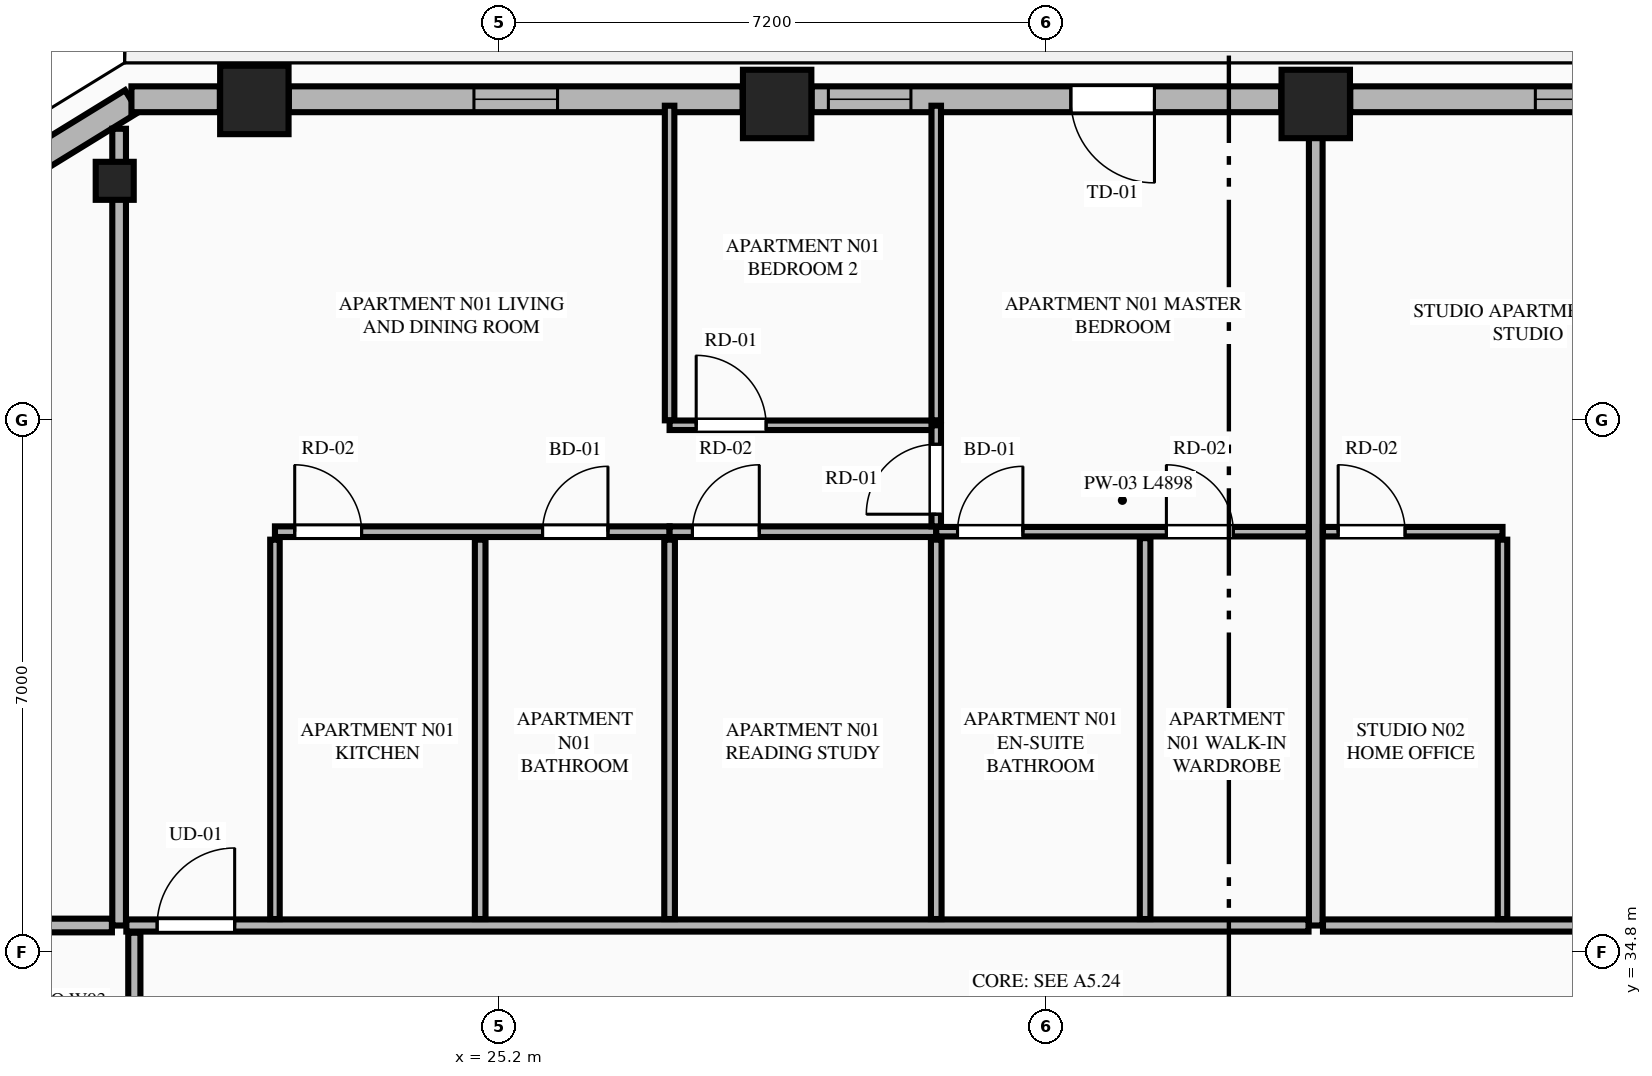
"""IFC4 building model, lengths in metres.
Left out: names, types, materials, properties, quantities, classifications, styles, units other than length and angle.
Written with IfcOpenShell. Run it as: python <this file> out.ifc"""

import sys

from ifc_helpers import new_model, si_unit, direction, frame, frame_2d, origin, origin_2d, place, context, subcontext, project, spatial, rectangle, extrude, element, fill, save


model = new_model("IFC4")
c1 = context("Model", 3, precision=1e-05, world=origin(), true_north=direction((0.0, 1.0)))
c2 = subcontext(c1, "Body", "Model", "MODEL_VIEW")
j1 = project(units=[si_unit("LENGTHUNIT", "METRE"), si_unit("PLANEANGLEUNIT", "RADIAN")], contexts=[c1])
p1 = place(None, origin())
s1 = spatial("IfcSite", under=j1, at=p1, CompositionType="ELEMENT")
p2 = place(p1, origin())
s2 = spatial("IfcBuilding", under=s1, at=p2, CompositionType="ELEMENT")
p3 = place(p2, frame((0.0, 0.0, 203.85)))
s3 = spatial("IfcBuildingStorey", under=s2, at=p3, CompositionType="ELEMENT", Elevation=203.85)
for number, where, z_axis, x_axis in (
    (1, (35.943, 45.958, 0.0), (0.0, 0.0, 1.0), (1.0, 0.0, 0.0)),
    (2, (28.857, 45.958, 0.0), (0.0, 0.0, 1.0), (1.0, 0.0, 0.0)),
    (3, (21.979, 46.011, 0.0), (0.0, 0.0, 1.0), (1.0, 0.0, 0.0)),
):
    element("IfcColumn", number, at=place(p3, frame(where, z_axis=z_axis, x_axis=x_axis)), inside=s3, PredefinedType="COLUMN", context=c2, shape_type="SweptSolid", body=[
        extrude(rectangle(XDim=0.9, YDim=0.9, at=origin_2d()), origin(), (0.0, 0.0, 1.0), 3.55),
    ])
p4 = place(p3, frame((20.142, 44.947, 0.0), z_axis=(0.0, 0.0, 1.0), x_axis=(-0.865230187018, -0.501374833306, 0.0)))
e4 = element("IfcColumn", 4, at=p4, inside=s3, PredefinedType="PILASTER", context=c2, shape_type="SweptSolid", body=[
    extrude(rectangle(XDim=0.5, YDim=0.35, at=origin_2d()), origin(), (0.0, 0.0, 1.0), 3.55),
])
p5 = place(p3, frame((20.367, 45.995, 0.0), z_axis=(0.0, 0.0, 1.0), x_axis=(-0.851713271379, -0.524008113828, 0.0)))
e5 = element("IfcWall", 5, at=p5, inside=s3, PredefinedType="STANDARD", context=c2, shape_type="SweptSolid", body=[
    extrude(rectangle(XDim=1.678, YDim=0.34, at=frame_2d((0.839, 0.0))), origin(), (0.0, 0.0, 1.0), 3.35),
])
p6 = place(p3, frame((42.367, 46.02, 0.0), z_axis=(0.0, 0.0, 1.0), x_axis=(-1.0, 0.0, 0.0)))
e6 = element("IfcWall", 6, at=p6, inside=s3, PredefinedType="STANDARD", context=c2, shape_type="SweptSolid", body=[
    extrude(rectangle(XDim=5.97, YDim=0.34, at=frame_2d((2.985, 0.0))), origin(), (0.0, 0.0, 1.0), 2.883),
])
p7 = place(p6, frame((2.435, 0.0, 0.75)))
e7 = element("IfcOpeningElement", 7, at=p7, cuts=e6, PredefinedType="OPENING", context=c2, shape_type="SweptSolid", body=[
    extrude(rectangle(XDim=1.1, YDim=1.983, at=frame_2d((0.55, 0.991))), frame((0.0, 0.18, 0.0), z_axis=(0.0, -1.0, 0.0), x_axis=(1.0, 0.0, 0.0)), (0.0, 0.0, 1.0), 0.36),
])
p8 = place(p3, frame((35.489, 46.02, 0.0), z_axis=(0.0, 0.0, 1.0), x_axis=(-1.0, 0.0, 0.0)))
e8 = element("IfcWall", 8, at=p8, inside=s3, PredefinedType="STANDARD", context=c2, shape_type="SweptSolid", body=[
    extrude(rectangle(XDim=6.178, YDim=0.34, at=frame_2d((3.089, 0.0))), origin(), (0.0, 0.0, 1.0), 2.883),
])
p9 = place(p8, frame((1.668, 0.0, 0.0)))
e9 = element("IfcOpeningElement", 9, at=p9, cuts=e8, PredefinedType="OPENING", context=c2, shape_type="SweptSolid", body=[
    extrude(rectangle(XDim=1.1, YDim=2.25, at=frame_2d((0.55, 1.125))), frame((0.0, 0.18, 0.0), z_axis=(0.0, -1.0, 0.0), x_axis=(1.0, 0.0, 0.0)), (0.0, 0.0, 1.0), 0.36),
])
p10 = place(p8, frame((4.872, 0.0, 0.75)))
e10 = element("IfcOpeningElement", 10, at=p10, cuts=e8, PredefinedType="OPENING", context=c2, shape_type="SweptSolid", body=[
    extrude(rectangle(XDim=1.086, YDim=1.983, at=frame_2d((0.543, 0.991))), frame((0.0, 0.18, 0.0), z_axis=(0.0, -1.0, 0.0), x_axis=(1.0, 0.0, 0.0)), (0.0, 0.0, 1.0), 0.36),
])
p11 = place(p3, frame((28.403, 46.02, 0.0), z_axis=(0.0, 0.0, 1.0), x_axis=(-1.0, 0.0, 0.0)))
e11 = element("IfcWall", 11, at=p11, inside=s3, PredefinedType="STANDARD", context=c2, shape_type="SweptSolid", body=[
    extrude(rectangle(XDim=5.97, YDim=0.34, at=frame_2d((2.985, 0.0))), origin(), (0.0, 0.0, 1.0), 2.883),
])
p12 = place(p11, frame((2.435, 0.0, 0.75)))
e12 = element("IfcOpeningElement", 12, at=p12, cuts=e11, PredefinedType="OPENING", context=c2, shape_type="SweptSolid", body=[
    extrude(rectangle(XDim=1.1, YDim=1.983, at=frame_2d((0.55, 0.991))), frame((0.0, 0.18, 0.0), z_axis=(0.0, -1.0, 0.0), x_axis=(1.0, 0.0, 0.0)), (0.0, 0.0, 1.0), 0.36),
])
p13 = place(p3, frame((21.525, 46.02, 0.0), z_axis=(0.0, 0.0, 1.0), x_axis=(-1.0, 0.0, 0.0)))
e13 = element("IfcWall", 13, at=p13, inside=s3, PredefinedType="STANDARD", context=c2, shape_type="SweptSolid", body=[
    extrude(rectangle(XDim=1.163, YDim=0.34, at=frame_2d((0.582, 0.0))), origin(), (0.0, 0.0, 1.0), 3.35),
])
p14 = place(p3, frame((20.2, 35.15, 0.0), z_axis=(0.0, 0.0, 1.0), x_axis=(0.0, 1.0, 0.0)))
e14 = element("IfcWall", 14, at=p14, inside=s3, PredefinedType="PARTITIONING", context=c2, shape_type="SweptSolid", body=[
    extrude(rectangle(XDim=10.482, YDim=0.18, at=frame_2d((5.241, 0.0))), origin(), (0.0, 0.0, 1.0), 3.35),
])
p15 = place(p3, frame((35.943, 35.15, 0.0), z_axis=(0.0, 0.0, 1.0), x_axis=(0.0, 1.0, 0.0)))
e15 = element("IfcWall", 15, at=p15, inside=s3, PredefinedType="PARTITIONING", context=c2, shape_type="SweptSolid", body=[
    extrude(rectangle(XDim=10.695, YDim=0.18, at=frame_2d((5.348, 0.0))), origin(), (0.0, 0.0, 1.0), 2.807),
])
p16 = place(p3, frame((20.295, 35.15, 0.0), z_axis=(0.0, 0.0, 1.0), x_axis=(1.0, 0.0, 0.0)))
e16 = element("IfcWall", 16, at=p16, inside=s3, PredefinedType="PARTITIONING", context=c2, shape_type="SweptSolid", body=[
    extrude(rectangle(XDim=15.553, YDim=0.16, at=frame_2d((7.776, 0.0))), origin(), (0.0, 0.0, 1.0), 3.35),
])
p17 = place(p16, frame((0.405, 0.0, 0.0)))
e17 = element("IfcOpeningElement", 17, at=p17, cuts=e16, PredefinedType="OPENING", context=c2, shape_type="SweptSolid", body=[
    extrude(rectangle(XDim=1.02, YDim=2.25, at=frame_2d((0.51, 1.125))), frame((0.0, 0.09, 0.0), z_axis=(0.0, -1.0, 0.0), x_axis=(1.0, 0.0, 0.0)), (0.0, 0.0, 1.0), 0.18),
])
p18 = place(p3, frame((22.25, 35.235, 0.0), z_axis=(0.0, 0.0, 1.0), x_axis=(0.0, 1.0, 0.0)))
e18 = element("IfcWall", 18, at=p18, inside=s3, PredefinedType="PARTITIONING", context=c2, shape_type="SweptSolid", body=[
    extrude(rectangle(XDim=4.991, YDim=0.125, at=frame_2d((2.496, 0.0))), origin(), (0.0, 0.0, 1.0), 2.807),
])
p19 = place(p3, frame((22.25, 40.331, 0.0), z_axis=(0.0, 0.0, 1.0), x_axis=(1.0, 0.0, 0.0)))
e19 = element("IfcWall", 19, at=p19, inside=s3, PredefinedType="PLUMBINGWALL", context=c2, shape_type="SweptSolid", body=[
    extrude(rectangle(XDim=5.192, YDim=0.14, at=frame_2d((2.596, 0.0))), origin(), (0.0, 0.0, 1.0), 3.35),
])
p20 = place(p19, frame((3.521, 0.0, 0.0)))
e20 = element("IfcOpeningElement", 20, at=p20, cuts=e19, PredefinedType="OPENING", context=c2, shape_type="SweptSolid", body=[
    extrude(rectangle(XDim=0.86, YDim=2.1, at=frame_2d((0.43, 1.05))), frame((0.0, 0.08, 0.0), z_axis=(0.0, -1.0, 0.0), x_axis=(1.0, 0.0, 0.0)), (0.0, 0.0, 1.0), 0.16),
])
p21 = place(p19, frame((0.26, 0.0, 0.0)))
e21 = element("IfcOpeningElement", 21, at=p21, cuts=e19, PredefinedType="OPENING", context=c2, shape_type="SweptSolid", body=[
    extrude(rectangle(XDim=0.88, YDim=2.15, at=frame_2d((0.44, 1.075))), frame((0.0, 0.08, 0.0), z_axis=(0.0, -1.0, 0.0), x_axis=(1.0, 0.0, 0.0)), (0.0, 0.0, 1.0), 0.16),
])
p22 = place(p3, frame((27.442, 40.331, 0.0), z_axis=(0.0, 0.0, 1.0), x_axis=(1.0, 0.0, 0.0)))
e22 = element("IfcWall", 22, at=p22, inside=s3, PredefinedType="PLUMBINGWALL", context=c2, shape_type="SweptSolid", body=[
    extrude(rectangle(XDim=3.508, YDim=0.14, at=frame_2d((1.754, 0.0))), origin(), (0.0, 0.0, 1.0), 3.35),
])
p23 = place(p22, frame((0.3, 0.0, 0.0)))
e23 = element("IfcOpeningElement", 23, at=p23, cuts=e22, PredefinedType="OPENING", context=c2, shape_type="SweptSolid", body=[
    extrude(rectangle(XDim=0.88, YDim=2.15, at=frame_2d((0.44, 1.075))), frame((0.0, 0.08, 0.0), z_axis=(0.0, -1.0, 0.0), x_axis=(1.0, 0.0, 0.0)), (0.0, 0.0, 1.0), 0.16),
])
p24 = place(p3, frame((30.95, 40.331, 0.0), z_axis=(0.0, 0.0, 1.0), x_axis=(1.0, 0.0, 0.0)))
e24 = element("IfcWall", 24, at=p24, inside=s3, PredefinedType="PARTITIONING", context=c2, shape_type="SweptSolid", body=[
    extrude(rectangle(XDim=4.898, YDim=0.125, at=frame_2d((2.449, 0.0))), origin(), (0.0, 0.0, 1.0), 3.35),
])
p25 = place(p24, frame((0.28, 0.0, 0.0)))
e25 = element("IfcOpeningElement", 25, at=p25, cuts=e24, PredefinedType="OPENING", context=c2, shape_type="SweptSolid", body=[
    extrude(rectangle(XDim=0.86, YDim=2.1, at=frame_2d((0.43, 1.05))), frame((0.0, 0.073, 0.0), z_axis=(0.0, -1.0, 0.0), x_axis=(1.0, 0.0, 0.0)), (0.0, 0.0, 1.0), 0.145),
])
p26 = place(p24, frame((3.028, 0.0, 0.0)))
e26 = element("IfcOpeningElement", 26, at=p26, cuts=e24, PredefinedType="OPENING", context=c2, shape_type="SweptSolid", body=[
    extrude(rectangle(XDim=0.88, YDim=2.15, at=frame_2d((0.44, 1.075))), frame((0.0, 0.073, 0.0), z_axis=(0.0, -1.0, 0.0), x_axis=(1.0, 0.0, 0.0)), (0.0, 0.0, 1.0), 0.145),
])
p27 = place(p3, frame((24.95, 35.235, 0.0), z_axis=(0.0, 0.0, 1.0), x_axis=(0.0, 1.0, 0.0)))
e27 = element("IfcWall", 27, at=p27, inside=s3, PredefinedType="PLUMBINGWALL", context=c2, shape_type="SweptSolid", body=[
    extrude(rectangle(XDim=4.991, YDim=0.14, at=frame_2d((2.496, 0.0))), origin(), (0.0, 0.0, 1.0), 3.35),
])
p28 = place(p3, frame((27.442, 41.796, 0.0), z_axis=(0.0, 0.0, 1.0), x_axis=(0.0, 1.0, 0.0)))
e28 = element("IfcWall", 28, at=p28, inside=s3, PredefinedType="PARTITIONING", context=c2, shape_type="SweptSolid", body=[
    extrude(rectangle(XDim=4.139, YDim=0.125, at=frame_2d((2.07, 0.0))), origin(), (0.0, 0.0, 1.0), 3.35),
])
p29 = place(p3, frame((27.442, 41.731, 0.0), z_axis=(0.0, 0.0, 1.0), x_axis=(1.0, 0.0, 0.0)))
e29 = element("IfcWall", 29, at=p29, inside=s3, PredefinedType="PARTITIONING", context=c2, shape_type="SweptSolid", body=[
    extrude(rectangle(XDim=3.508, YDim=0.125, at=frame_2d((1.754, 0.0))), origin(), (0.0, 0.0, 1.0), 3.35),
])
p30 = place(p29, frame((0.35, 0.0, 0.0)))
e30 = element("IfcOpeningElement", 30, at=p30, cuts=e29, PredefinedType="OPENING", context=c2, shape_type="SweptSolid", body=[
    extrude(rectangle(XDim=0.92, YDim=2.15, at=frame_2d((0.46, 1.075))), frame((0.0, 0.073, 0.0), z_axis=(0.0, -1.0, 0.0), x_axis=(1.0, 0.0, 0.0)), (0.0, 0.0, 1.0), 0.145),
])
p31 = place(p3, frame((30.95, 40.401, 0.0), z_axis=(0.0, 0.0, 1.0), x_axis=(0.0, 1.0, 0.0)))
e31 = element("IfcWall", 31, at=p31, inside=s3, PredefinedType="PARTITIONING", context=c2, shape_type="SweptSolid", body=[
    extrude(rectangle(XDim=1.33, YDim=0.125, at=frame_2d((0.665, 0.0))), origin(), (0.0, 0.0, 1.0), 3.35),
])
p32 = place(p31, frame((0.16, 0.0, 0.0)))
e32 = element("IfcOpeningElement", 32, at=p32, cuts=e31, PredefinedType="OPENING", context=c2, shape_type="SweptSolid", body=[
    extrude(rectangle(XDim=0.92, YDim=2.15, at=frame_2d((0.46, 1.075))), frame((0.0, 0.073, 0.0), z_axis=(0.0, -1.0, 0.0), x_axis=(1.0, 0.0, 0.0)), (0.0, 0.0, 1.0), 0.145),
])
for number, where, z_axis, x_axis in (
    (33, (27.442, 35.235, 0.0), (0.0, 0.0, 1.0), (0.0, 1.0, 0.0)),
    (34, (30.95, 35.235, 0.0), (0.0, 0.0, 1.0), (0.0, 1.0, 0.0)),
):
    element("IfcWall", number, at=place(p3, frame(where, z_axis=z_axis, x_axis=x_axis)), inside=s3, PredefinedType="PLUMBINGWALL", context=c2, shape_type="SweptSolid", body=[
        extrude(rectangle(XDim=4.991, YDim=0.14, at=frame_2d((2.496, 0.0))), origin(), (0.0, 0.0, 1.0), 3.35),
    ])
p33 = place(p3, frame((30.95, 41.796, 0.0), z_axis=(0.0, 0.0, 1.0), x_axis=(0.0, 1.0, 0.0)))
e35 = element("IfcWall", 35, at=p33, inside=s3, PredefinedType="PARTITIONING", context=c2, shape_type="SweptSolid", body=[
    extrude(rectangle(XDim=4.139, YDim=0.125, at=frame_2d((2.07, 0.0))), origin(), (0.0, 0.0, 1.0), 3.35),
])
p34 = place(p3, frame((33.698, 35.235, 0.0), z_axis=(0.0, 0.0, 1.0), x_axis=(0.0, 1.0, 0.0)))
e36 = element("IfcWall", 36, at=p34, inside=s3, PredefinedType="PLUMBINGWALL", context=c2, shape_type="SweptSolid", body=[
    extrude(rectangle(XDim=5.011, YDim=0.14, at=frame_2d((2.505, 0.0))), origin(), (0.0, 0.0, 1.0), 3.35),
])
p35 = place(p3, frame((36.038, 35.15, 0.0), z_axis=(0.0, 0.0, 1.0), x_axis=(1.0, 0.0, 0.0)))
e37 = element("IfcWall", 37, at=p35, inside=s3, PredefinedType="PARTITIONING", context=c2, shape_type="SweptSolid", body=[
    extrude(rectangle(XDim=8.467, YDim=0.16, at=frame_2d((4.233, 0.0))), origin(), (0.0, 0.0, 1.0), 3.35),
])
p36 = place(p35, frame((6.212, 0.0, 0.0)))
e38 = element("IfcOpeningElement", 38, at=p36, cuts=e37, PredefinedType="OPENING", context=c2, shape_type="SweptSolid", body=[
    extrude(rectangle(XDim=1.02, YDim=2.25, at=frame_2d((0.51, 1.125))), frame((0.0, 0.09, 0.0), z_axis=(0.0, -1.0, 0.0), x_axis=(1.0, 0.0, 0.0)), (0.0, 0.0, 1.0), 0.18),
])
p37 = place(p3, frame((38.4, 35.235, 0.0), z_axis=(0.0, 0.0, 1.0), x_axis=(0.0, 1.0, 0.0)))
e39 = element("IfcWall", 39, at=p37, inside=s3, PredefinedType="PARTITIONING", context=c2, shape_type="SweptSolid", body=[
    extrude(rectangle(XDim=4.991, YDim=0.125, at=frame_2d((2.496, 0.0))), origin(), (0.0, 0.0, 1.0), 3.35),
])
p38 = place(p3, frame((36.038, 40.331, 0.0), z_axis=(0.0, 0.0, 1.0), x_axis=(1.0, 0.0, 0.0)))
e40 = element("IfcWall", 40, at=p38, inside=s3, PredefinedType="PARTITIONING", context=c2, shape_type="SweptSolid", body=[
    extrude(rectangle(XDim=2.362, YDim=0.125, at=frame_2d((1.181, 0.0))), origin(), (0.0, 0.0, 1.0), 3.35),
])
p39 = place(p38, frame((0.2, 0.0, 0.0)))
e41 = element("IfcOpeningElement", 41, at=p39, cuts=e40, PredefinedType="OPENING", context=c2, shape_type="SweptSolid", body=[
    extrude(rectangle(XDim=0.88, YDim=2.15, at=frame_2d((0.44, 1.075))), frame((0.0, 0.073, 0.0), z_axis=(0.0, -1.0, 0.0), x_axis=(1.0, 0.0, 0.0)), (0.0, 0.0, 1.0), 0.145),
])
p40 = place(p3, frame((14.11, 35.15, 0.0), z_axis=(0.0, 0.0, 1.0), x_axis=(1.0, 0.0, 0.0)))
e42 = element("IfcWall", 42, at=p40, inside=s3, PredefinedType="PARTITIONING", context=c2, shape_type="SweptSolid", body=[
    extrude(rectangle(XDim=5.995, YDim=0.18, at=frame_2d((2.998, 0.0))), origin(), (0.0, 0.0, 1.0), 3.35),
])
p41 = place(p3, frame((20.4, 29.008, 0.0), z_axis=(0.0, 0.0, 1.0), x_axis=(0.0, 1.0, 0.0)))
e43 = element("IfcWall", 43, at=p41, inside=s3, PredefinedType="PARTITIONING", context=c2, shape_type="SweptSolid", body=[
    extrude(rectangle(XDim=6.047, YDim=0.16, at=frame_2d((3.023, 0.0))), origin(), (0.0, 0.0, 1.0), 3.35),
])
p42 = place(p41, frame((0.4, 0.0, 0.0)))
e44 = element("IfcOpeningElement", 44, at=p42, cuts=e43, PredefinedType="OPENING", context=c2, shape_type="SweptSolid", body=[
    extrude(rectangle(XDim=1.02, YDim=2.25, at=frame_2d((0.51, 1.125))), frame((0.0, 0.09, 0.0), z_axis=(0.0, -1.0, 0.0), x_axis=(1.0, 0.0, 0.0)), (0.0, 0.0, 1.0), 0.18),
])
p43 = place(p7, origin())
e45 = element("IfcWindow", 45, at=p43, inside=s3, PartitioningType="SINGLE_PANEL", PredefinedType="WINDOW", context=c2, shape_type="SweptSolid", body=[
    extrude(rectangle(XDim=1.1, YDim=1.983, at=frame_2d((0.55, 0.991))), frame((0.0, 0.03, 0.0), z_axis=(0.0, -1.0, 0.0), x_axis=(1.0, 0.0, 0.0)), (0.0, 0.0, 1.0), 0.06),
])
fill(e7, e45)
p44 = place(p9, origin())
e46 = element("IfcDoor", 46, at=p44, inside=s3, OperationType="SINGLE_SWING_LEFT", PredefinedType="DOOR", context=c2, shape_type="SweptSolid", body=[
    extrude(rectangle(XDim=1.1, YDim=2.25, at=frame_2d((0.55, 1.125))), frame((0.0, 0.025, 0.0), z_axis=(0.0, -1.0, 0.0), x_axis=(1.0, 0.0, 0.0)), (0.0, 0.0, 1.0), 0.05),
])
fill(e9, e46)
p45 = place(p12, origin())
e47 = element("IfcWindow", 47, at=p45, inside=s3, PartitioningType="SINGLE_PANEL", PredefinedType="WINDOW", context=c2, shape_type="SweptSolid", body=[
    extrude(rectangle(XDim=1.1, YDim=1.983, at=frame_2d((0.55, 0.991))), frame((0.0, 0.03, 0.0), z_axis=(0.0, -1.0, 0.0), x_axis=(1.0, 0.0, 0.0)), (0.0, 0.0, 1.0), 0.06),
])
fill(e12, e47)
p46 = place(p20, origin())
e48 = element("IfcDoor", 48, at=p46, inside=s3, OperationType="SINGLE_SWING_RIGHT", PredefinedType="DOOR", context=c2, shape_type="SweptSolid", body=[
    extrude(rectangle(XDim=0.86, YDim=2.1, at=frame_2d((0.43, 1.05))), frame((0.0, 0.025, 0.0), z_axis=(0.0, -1.0, 0.0), x_axis=(1.0, 0.0, 0.0)), (0.0, 0.0, 1.0), 0.05),
])
fill(e20, e48)
p47 = place(p25, origin())
e49 = element("IfcDoor", 49, at=p47, inside=s3, OperationType="SINGLE_SWING_RIGHT", PredefinedType="DOOR", context=c2, shape_type="SweptSolid", body=[
    extrude(rectangle(XDim=0.86, YDim=2.1, at=frame_2d((0.43, 1.05))), frame((0.0, 0.025, 0.0), z_axis=(0.0, -1.0, 0.0), x_axis=(1.0, 0.0, 0.0)), (0.0, 0.0, 1.0), 0.05),
])
fill(e25, e49)
p48 = place(p26, origin())
e50 = element("IfcDoor", 50, at=p48, inside=s3, OperationType="SINGLE_SWING_LEFT", PredefinedType="DOOR", context=c2, shape_type="SweptSolid", body=[
    extrude(rectangle(XDim=0.88, YDim=2.15, at=frame_2d((0.44, 1.075))), frame((0.0, 0.025, 0.0), z_axis=(0.0, -1.0, 0.0), x_axis=(1.0, 0.0, 0.0)), (0.0, 0.0, 1.0), 0.05),
])
fill(e26, e50)
p49 = place(p17, origin())
e51 = element("IfcDoor", 51, at=p49, inside=s3, OperationType="SINGLE_SWING_RIGHT", PredefinedType="DOOR", context=c2, shape_type="SweptSolid", body=[
    extrude(rectangle(XDim=1.02, YDim=2.25, at=frame_2d((0.51, 1.125))), frame((0.0, 0.025, 0.0), z_axis=(0.0, -1.0, 0.0), x_axis=(1.0, 0.0, 0.0)), (0.0, 0.0, 1.0), 0.05),
])
fill(e17, e51)
p50 = place(p21, origin())
e52 = element("IfcDoor", 52, at=p50, inside=s3, OperationType="SINGLE_SWING_LEFT", PredefinedType="DOOR", context=c2, shape_type="SweptSolid", body=[
    extrude(rectangle(XDim=0.88, YDim=2.15, at=frame_2d((0.44, 1.075))), frame((0.0, 0.025, 0.0), z_axis=(0.0, -1.0, 0.0), x_axis=(1.0, 0.0, 0.0)), (0.0, 0.0, 1.0), 0.05),
])
fill(e21, e52)
p51 = place(p23, origin())
e53 = element("IfcDoor", 53, at=p51, inside=s3, OperationType="SINGLE_SWING_RIGHT", PredefinedType="DOOR", context=c2, shape_type="SweptSolid", body=[
    extrude(rectangle(XDim=0.88, YDim=2.15, at=frame_2d((0.44, 1.075))), frame((0.0, 0.025, 0.0), z_axis=(0.0, -1.0, 0.0), x_axis=(1.0, 0.0, 0.0)), (0.0, 0.0, 1.0), 0.05),
])
fill(e23, e53)
p52 = place(p30, origin())
e54 = element("IfcDoor", 54, at=p52, inside=s3, OperationType="SINGLE_SWING_LEFT", PredefinedType="DOOR", context=c2, shape_type="SweptSolid", body=[
    extrude(rectangle(XDim=0.92, YDim=2.15, at=frame_2d((0.46, 1.075))), frame((0.0, 0.025, 0.0), z_axis=(0.0, -1.0, 0.0), x_axis=(1.0, 0.0, 0.0)), (0.0, 0.0, 1.0), 0.05),
])
fill(e30, e54)
p53 = place(p32, origin())
e55 = element("IfcDoor", 55, at=p53, inside=s3, OperationType="SINGLE_SWING_LEFT", PredefinedType="DOOR", context=c2, shape_type="SweptSolid", body=[
    extrude(rectangle(XDim=0.92, YDim=2.15, at=frame_2d((0.46, 1.075))), frame((0.0, 0.025, 0.0), z_axis=(0.0, -1.0, 0.0), x_axis=(1.0, 0.0, 0.0)), (0.0, 0.0, 1.0), 0.05),
])
fill(e32, e55)
p54 = place(p39, origin())
e56 = element("IfcDoor", 56, at=p54, inside=s3, OperationType="SINGLE_SWING_LEFT", PredefinedType="DOOR", context=c2, shape_type="SweptSolid", body=[
    extrude(rectangle(XDim=0.88, YDim=2.15, at=frame_2d((0.44, 1.075))), frame((0.0, 0.025, 0.0), z_axis=(0.0, -1.0, 0.0), x_axis=(1.0, 0.0, 0.0)), (0.0, 0.0, 1.0), 0.05),
])
fill(e41, e56)
p55 = place(p10, origin())
e57 = element("IfcWindow", 57, at=p55, inside=s3, PartitioningType="SINGLE_PANEL", PredefinedType="WINDOW", context=c2, shape_type="SweptSolid", body=[
    extrude(rectangle(XDim=1.086, YDim=1.983, at=frame_2d((0.543, 0.991))), frame((0.0, 0.03, 0.0), z_axis=(0.0, -1.0, 0.0), x_axis=(1.0, 0.0, 0.0)), (0.0, 0.0, 1.0), 0.06),
])
fill(e10, e57)
save(model, sys.argv[1])
